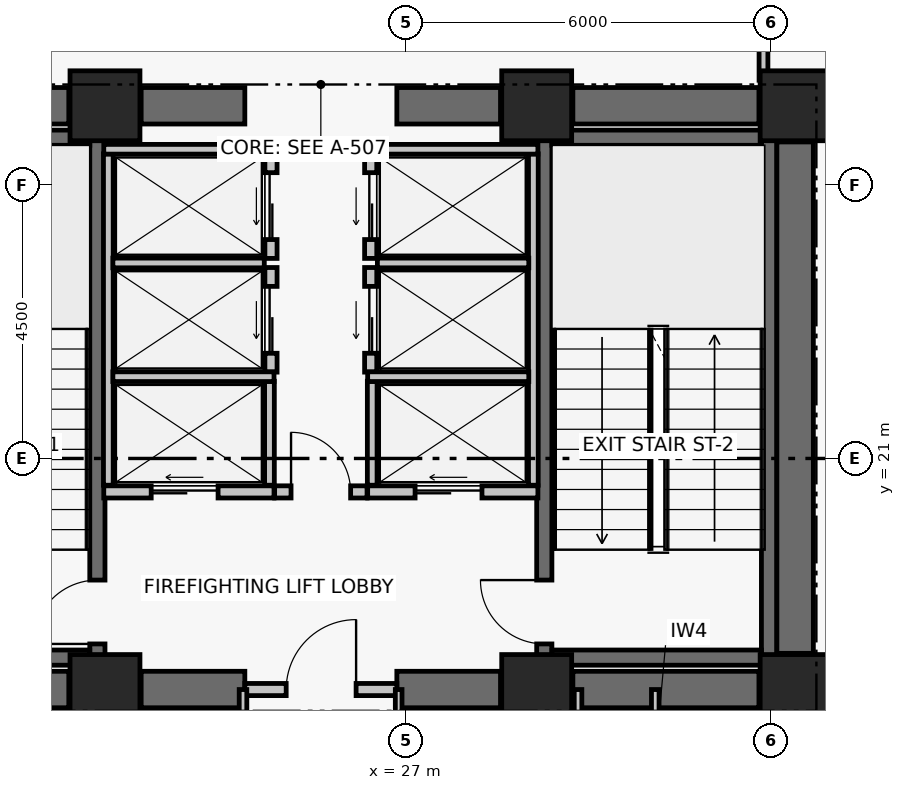
"""IFC4 building model, lengths in metres.
Left out: names, types, materials, properties, quantities, classifications, styles, units other than length and angle.
Written with IfcOpenShell. Run it as: python <this file> out.ifc"""

import sys

from ifc_helpers import new_model, si_unit, direction, frame, frame_2d, origin, origin_2d, place, context, subcontext, project, spatial, rectangle, extrude, element, fill, save


model = new_model("IFC4")
c1 = context("Model", 3, precision=1e-05, world=origin(), true_north=direction((0.0, 1.0)))
c2 = subcontext(c1, "Body", "Model", "MODEL_VIEW")
j1 = project(units=[si_unit("LENGTHUNIT", "METRE"), si_unit("PLANEANGLEUNIT", "RADIAN")], contexts=[c1])
p1 = place(None, origin())
s1 = spatial("IfcSite", under=j1, at=p1, CompositionType="ELEMENT")
p2 = place(p1, origin())
s2 = spatial("IfcBuilding", under=s1, at=p2, CompositionType="ELEMENT")
p3 = place(p2, frame((0.0, 0.0, 75.96)))
s3 = spatial("IfcBuildingStorey", under=s2, at=p3, CompositionType="ELEMENT", Elevation=75.96)
for number, where, z_axis, x_axis in (
    (1, (22.05, 17.2, 0.0), (0.0, 0.0, 1.0), (1.0, 0.0, 0.0)),
    (2, (29.15, 17.2, 0.0), (0.0, 0.0, 1.0), (1.0, 0.0, 0.0)),
    (3, (33.4, 17.2, 0.0), (0.0, 0.0, 1.0), (1.0, 0.0, 0.0)),
    (4, (22.05, 26.8, 0.0), (0.0, 0.0, 1.0), (1.0, 0.0, 0.0)),
    (5, (29.15, 26.8, 0.0), (0.0, 0.0, 1.0), (1.0, 0.0, 0.0)),
    (6, (33.4, 26.8, 0.0), (0.0, 0.0, 1.0), (1.0, 0.0, 0.0)),
):
    element("IfcColumn", number, at=place(p3, frame(where, z_axis=z_axis, x_axis=x_axis)), inside=s3, PredefinedType="COLUMN", context=c2, shape_type="SweptSolid", body=[
        extrude(rectangle(XDim=1.15, YDim=1.15, at=origin_2d()), origin(), (0.0, 0.0, 1.0), 3.72),
    ])
p4 = place(p3, frame((18.395, 17.2, 0.0), z_axis=(0.0, 0.0, 1.0), x_axis=(1.0, 0.0, 0.0)))
e7 = element("IfcWall", 7, at=p4, inside=s3, PredefinedType="SHEAR", context=c2, shape_type="SweptSolid", body=[
    extrude(rectangle(XDim=3.06, YDim=0.6, at=frame_2d((1.53, 0.0))), origin(), (0.0, 0.0, 1.0), 3.47),
])
p5 = place(p3, frame((22.645, 17.2, 0.0), z_axis=(0.0, 0.0, 1.0), x_axis=(1.0, 0.0, 0.0)))
e8 = element("IfcWall", 8, at=p5, inside=s3, PredefinedType="SHEAR", context=c2, shape_type="SweptSolid", body=[
    extrude(rectangle(XDim=1.705, YDim=0.6, at=frame_2d((0.853, 0.0))), origin(), (0.0, 0.0, 1.0), 3.47),
])
p6 = place(p3, frame((26.85, 17.2, 0.0), z_axis=(0.0, 0.0, 1.0), x_axis=(1.0, 0.0, 0.0)))
e9 = element("IfcWall", 9, at=p6, inside=s3, PredefinedType="SHEAR", context=c2, shape_type="SweptSolid", body=[
    extrude(rectangle(XDim=1.705, YDim=0.6, at=frame_2d((0.853, 0.0))), origin(), (0.0, 0.0, 1.0), 3.47),
])
p7 = place(p3, frame((29.745, 17.2, 0.0), z_axis=(0.0, 0.0, 1.0), x_axis=(1.0, 0.0, 0.0)))
e10 = element("IfcWall", 10, at=p7, inside=s3, PredefinedType="SHEAR", context=c2, shape_type="SweptSolid", body=[
    extrude(rectangle(XDim=3.06, YDim=0.6, at=frame_2d((1.53, 0.0))), origin(), (0.0, 0.0, 1.0), 3.47),
])
p8 = place(p3, frame((18.395, 26.8, 0.0), z_axis=(0.0, 0.0, 1.0), x_axis=(1.0, 0.0, 0.0)))
e11 = element("IfcWall", 11, at=p8, inside=s3, PredefinedType="SHEAR", context=c2, shape_type="SweptSolid", body=[
    extrude(rectangle(XDim=3.06, YDim=0.6, at=frame_2d((1.53, 0.0))), origin(), (0.0, 0.0, 1.0), 3.47),
])
p9 = place(p3, frame((22.645, 26.8, 0.0), z_axis=(0.0, 0.0, 1.0), x_axis=(1.0, 0.0, 0.0)))
e12 = element("IfcWall", 12, at=p9, inside=s3, PredefinedType="SHEAR", context=c2, shape_type="SweptSolid", body=[
    extrude(rectangle(XDim=1.705, YDim=0.6, at=frame_2d((0.853, 0.0))), origin(), (0.0, 0.0, 1.0), 3.47),
])
p10 = place(p3, frame((26.85, 26.8, 0.0), z_axis=(0.0, 0.0, 1.0), x_axis=(1.0, 0.0, 0.0)))
e13 = element("IfcWall", 13, at=p10, inside=s3, PredefinedType="SHEAR", context=c2, shape_type="SweptSolid", body=[
    extrude(rectangle(XDim=1.705, YDim=0.6, at=frame_2d((0.853, 0.0))), origin(), (0.0, 0.0, 1.0), 3.47),
])
p11 = place(p3, frame((29.745, 26.8, 0.0), z_axis=(0.0, 0.0, 1.0), x_axis=(1.0, 0.0, 0.0)))
e14 = element("IfcWall", 14, at=p11, inside=s3, PredefinedType="SHEAR", context=c2, shape_type="SweptSolid", body=[
    extrude(rectangle(XDim=3.06, YDim=0.6, at=frame_2d((1.53, 0.0))), origin(), (0.0, 0.0, 1.0), 3.47),
])
p12 = place(p3, frame((33.4, 17.795, 0.0), z_axis=(0.0, 0.0, 1.0), x_axis=(0.0, 1.0, 0.0)))
e15 = element("IfcWall", 15, at=p12, inside=s3, PredefinedType="SHEAR", context=c2, shape_type="SweptSolid", body=[
    extrude(rectangle(XDim=8.41, YDim=0.6, at=frame_2d((4.205, 0.0))), origin(), (0.0, 0.0, 1.0), 3.47),
])
p13 = place(p3, frame((21.925, 17.6, 0.0), z_axis=(0.0, 0.0, 1.0), x_axis=(0.0, 1.0, 0.0)))
e16 = element("IfcWall", 16, at=p13, inside=s3, PredefinedType="SHEAR", context=c2, shape_type="SweptSolid", body=[
    extrude(rectangle(XDim=8.8, YDim=0.25, at=frame_2d((4.4, 0.0))), origin(), (0.0, 0.0, 1.0), 3.47),
])
p14 = place(p13, frame((0.35, 0.0, 0.0)))
e17 = element("IfcOpeningElement", 17, at=p14, cuts=e16, PredefinedType="OPENING", context=c2, shape_type="SweptSolid", body=[
    extrude(rectangle(XDim=1.05, YDim=2.08, at=frame_2d((0.525, 1.04))), frame((0.0, 0.135, 0.0), z_axis=(0.0, -1.0, 0.0), x_axis=(1.0, 0.0, 0.0)), (0.0, 0.0, 1.0), 0.27),
])
for number, where, z_axis, x_axis in (
    (18, (18.354, 17.725, 0.0), (0.0, 0.0, 1.0), (1.0, 0.0, 0.0)),
    (19, (18.354, 26.275, 0.0), (0.0, 0.0, 1.0), (1.0, 0.0, 0.0)),
):
    element("IfcWall", number, at=place(p3, frame(where, z_axis=z_axis, x_axis=x_axis)), inside=s3, PredefinedType="SHEAR", context=c2, shape_type="SweptSolid", body=[
        extrude(rectangle(XDim=3.446, YDim=0.25, at=frame_2d((1.723, 0.0))), origin(), (0.0, 0.0, 1.0), 3.47),
    ])
p15 = place(p3, frame((29.275, 17.6, 0.0), z_axis=(0.0, 0.0, 1.0), x_axis=(0.0, 1.0, 0.0)))
e20 = element("IfcWall", 20, at=p15, inside=s3, PredefinedType="SHEAR", context=c2, shape_type="SweptSolid", body=[
    extrude(rectangle(XDim=8.8, YDim=0.25, at=frame_2d((4.4, 0.0))), origin(), (0.0, 0.0, 1.0), 3.47),
])
p16 = place(p15, frame((0.35, 0.0, 0.0)))
e21 = element("IfcOpeningElement", 21, at=p16, cuts=e20, PredefinedType="OPENING", context=c2, shape_type="SweptSolid", body=[
    extrude(rectangle(XDim=1.05, YDim=2.08, at=frame_2d((0.525, 1.04))), frame((0.0, 0.135, 0.0), z_axis=(0.0, -1.0, 0.0), x_axis=(1.0, 0.0, 0.0)), (0.0, 0.0, 1.0), 0.27),
])
p17 = place(p3, frame((32.971, 17.6, 0.0), z_axis=(0.0, 0.0, 1.0), x_axis=(0.0, 1.0, 0.0)))
e22 = element("IfcWall", 22, at=p17, inside=s3, PredefinedType="SHEAR", context=c2, shape_type="SweptSolid", body=[
    extrude(rectangle(XDim=8.8, YDim=0.25, at=frame_2d((4.4, 0.0))), origin(), (0.0, 0.0, 1.0), 3.47),
])
for number, where, z_axis, x_axis in (
    (23, (29.4, 17.725, 0.0), (0.0, 0.0, 1.0), (1.0, 0.0, 0.0)),
    (24, (29.4, 26.275, 0.0), (0.0, 0.0, 1.0), (1.0, 0.0, 0.0)),
):
    element("IfcWall", number, at=place(p3, frame(where, z_axis=z_axis, x_axis=x_axis)), inside=s3, PredefinedType="SHEAR", context=c2, shape_type="SweptSolid", body=[
        extrude(rectangle(XDim=3.446, YDim=0.25, at=frame_2d((1.723, 0.0))), origin(), (0.0, 0.0, 1.0), 3.47),
    ])
p18 = place(p3, frame((24.35, 17.2, 0.0), z_axis=(0.0, 0.0, 1.0), x_axis=(1.0, 0.0, 0.0)))
e25 = element("IfcWall", 25, at=p18, inside=s3, PredefinedType="PARTITIONING", context=c2, shape_type="SweptSolid", body=[
    extrude(rectangle(XDim=2.5, YDim=0.2, at=frame_2d((1.25, 0.0))), origin(), (0.0, 0.0, 1.0), 2.6),
])
p19 = place(p18, frame((0.68, 0.0, 0.0)))
e26 = element("IfcOpeningElement", 26, at=p19, cuts=e25, PredefinedType="OPENING", context=c2, shape_type="SweptSolid", body=[
    extrude(rectangle(XDim=1.15, YDim=2.08, at=frame_2d((0.575, 1.04))), frame((0.0, 0.11, 0.0), z_axis=(0.0, -1.0, 0.0), x_axis=(1.0, 0.0, 0.0)), (0.0, 0.0, 1.0), 0.22),
])
p20 = place(p3, frame((24.84, 20.45, 0.0), z_axis=(0.0, 0.0, 1.0), x_axis=(1.0, 0.0, 0.0)))
e27 = element("IfcWall", 27, at=p20, inside=s3, PredefinedType="PARTITIONING", context=c2, shape_type="SweptSolid", body=[
    extrude(rectangle(XDim=1.52, YDim=0.2, at=frame_2d((0.76, 0.0))), origin(), (0.0, 0.0, 1.0), 3.47),
])
p21 = place(p20, frame((0.27, 0.0, 0.0)))
e28 = element("IfcOpeningElement", 28, at=p21, cuts=e27, PredefinedType="OPENING", context=c2, shape_type="SweptSolid", body=[
    extrude(rectangle(XDim=0.98, YDim=2.06, at=frame_2d((0.49, 1.03))), frame((0.0, 0.11, 0.0), z_axis=(0.0, -1.0, 0.0), x_axis=(1.0, 0.0, 0.0)), (0.0, 0.0, 1.0), 0.22),
])
p22 = place(p3, frame((22.03, 20.45, 0.0), z_axis=(0.0, 0.0, 1.0), x_axis=(1.0, 0.0, 0.0)))
e29 = element("IfcWall", 29, at=p22, inside=s3, PredefinedType="PARTITIONING", context=c2, shape_type="SweptSolid", body=[
    extrude(rectangle(XDim=2.8, YDim=0.2, at=frame_2d((1.4, 0.0))), origin(), (0.0, 0.0, 1.0), 3.47),
])
p23 = place(p22, frame((0.78, 0.0, 0.0)))
e30 = element("IfcOpeningElement", 30, at=p23, cuts=e29, PredefinedType="OPENING", context=c2, shape_type="SweptSolid", body=[
    extrude(rectangle(XDim=1.1, YDim=2.08, at=frame_2d((0.55, 1.04))), frame((0.0, 0.11, 0.0), z_axis=(0.0, -1.0, 0.0), x_axis=(1.0, 0.0, 0.0)), (0.0, 0.0, 1.0), 0.22),
])
p24 = place(p3, frame((26.37, 20.45, 0.0), z_axis=(0.0, 0.0, 1.0), x_axis=(1.0, 0.0, 0.0)))
e31 = element("IfcWall", 31, at=p24, inside=s3, PredefinedType="PARTITIONING", context=c2, shape_type="SweptSolid", body=[
    extrude(rectangle(XDim=2.8, YDim=0.2, at=frame_2d((1.4, 0.0))), origin(), (0.0, 0.0, 1.0), 3.47),
])
p25 = place(p24, frame((0.78, 0.0, 0.0)))
e32 = element("IfcOpeningElement", 32, at=p25, cuts=e31, PredefinedType="OPENING", context=c2, shape_type="SweptSolid", body=[
    extrude(rectangle(XDim=1.1, YDim=2.08, at=frame_2d((0.55, 1.04))), frame((0.0, 0.11, 0.0), z_axis=(0.0, -1.0, 0.0), x_axis=(1.0, 0.0, 0.0)), (0.0, 0.0, 1.0), 0.22),
])
p26 = place(p3, frame((24.78, 22.42, 0.0), z_axis=(0.0, 0.0, 1.0), x_axis=(0.0, 1.0, 0.0)))
e33 = element("IfcWall", 33, at=p26, inside=s3, PredefinedType="PARTITIONING", context=c2, shape_type="SweptSolid", body=[
    extrude(rectangle(XDim=1.72, YDim=0.2, at=frame_2d((0.86, 0.0))), origin(), (0.0, 0.0, 1.0), 3.47),
])
p27 = place(p26, frame((0.31, 0.0, 0.0)))
e34 = element("IfcOpeningElement", 34, at=p27, cuts=e33, PredefinedType="OPENING", context=c2, shape_type="SweptSolid", body=[
    extrude(rectangle(XDim=1.1, YDim=2.08, at=frame_2d((0.55, 1.04))), frame((0.0, 0.11, 0.0), z_axis=(0.0, -1.0, 0.0), x_axis=(1.0, 0.0, 0.0)), (0.0, 0.0, 1.0), 0.22),
])
p28 = place(p3, frame((24.78, 24.29, 0.0), z_axis=(0.0, 0.0, 1.0), x_axis=(0.0, 1.0, 0.0)))
e35 = element("IfcWall", 35, at=p28, inside=s3, PredefinedType="PARTITIONING", context=c2, shape_type="SweptSolid", body=[
    extrude(rectangle(XDim=1.72, YDim=0.2, at=frame_2d((0.86, 0.0))), origin(), (0.0, 0.0, 1.0), 3.47),
])
p29 = place(p28, frame((0.31, 0.0, 0.0)))
e36 = element("IfcOpeningElement", 36, at=p29, cuts=e35, PredefinedType="OPENING", context=c2, shape_type="SweptSolid", body=[
    extrude(rectangle(XDim=1.1, YDim=2.08, at=frame_2d((0.55, 1.04))), frame((0.0, 0.11, 0.0), z_axis=(0.0, -1.0, 0.0), x_axis=(1.0, 0.0, 0.0)), (0.0, 0.0, 1.0), 0.22),
])
p30 = place(p3, frame((26.42, 22.42, 0.0), z_axis=(0.0, 0.0, 1.0), x_axis=(0.0, 1.0, 0.0)))
e37 = element("IfcWall", 37, at=p30, inside=s3, PredefinedType="PARTITIONING", context=c2, shape_type="SweptSolid", body=[
    extrude(rectangle(XDim=1.72, YDim=0.2, at=frame_2d((0.86, 0.0))), origin(), (0.0, 0.0, 1.0), 3.47),
])
p31 = place(p30, frame((0.31, 0.0, 0.0)))
e38 = element("IfcOpeningElement", 38, at=p31, cuts=e37, PredefinedType="OPENING", context=c2, shape_type="SweptSolid", body=[
    extrude(rectangle(XDim=1.1, YDim=2.08, at=frame_2d((0.55, 1.04))), frame((0.0, 0.11, 0.0), z_axis=(0.0, -1.0, 0.0), x_axis=(1.0, 0.0, 0.0)), (0.0, 0.0, 1.0), 0.22),
])
p32 = place(p3, frame((26.42, 24.29, 0.0), z_axis=(0.0, 0.0, 1.0), x_axis=(0.0, 1.0, 0.0)))
e39 = element("IfcWall", 39, at=p32, inside=s3, PredefinedType="PARTITIONING", context=c2, shape_type="SweptSolid", body=[
    extrude(rectangle(XDim=1.72, YDim=0.2, at=frame_2d((0.86, 0.0))), origin(), (0.0, 0.0, 1.0), 3.47),
])
p33 = place(p32, frame((0.31, 0.0, 0.0)))
e40 = element("IfcOpeningElement", 40, at=p33, cuts=e39, PredefinedType="OPENING", context=c2, shape_type="SweptSolid", body=[
    extrude(rectangle(XDim=1.1, YDim=2.08, at=frame_2d((0.55, 1.04))), frame((0.0, 0.11, 0.0), z_axis=(0.0, -1.0, 0.0), x_axis=(1.0, 0.0, 0.0)), (0.0, 0.0, 1.0), 0.22),
])
p34 = place(p3, frame((22.105, 20.56, 0.0), z_axis=(0.0, 0.0, 1.0), x_axis=(0.0, 1.0, 0.0)))
e41 = element("IfcWall", 41, at=p34, inside=s3, PredefinedType="PARTITIONING", context=c2, shape_type="SweptSolid", body=[
    extrude(rectangle(XDim=5.45, YDim=0.16, at=frame_2d((2.725, 0.0))), origin(), (0.0, 0.0, 1.0), 3.47),
])
p35 = place(p3, frame((24.755, 20.56, 0.0), z_axis=(0.0, 0.0, 1.0), x_axis=(0.0, 1.0, 0.0)))
e42 = element("IfcWall", 42, at=p35, inside=s3, PredefinedType="PARTITIONING", context=c2, shape_type="SweptSolid", body=[
    extrude(rectangle(XDim=1.71, YDim=0.16, at=frame_2d((0.855, 0.0))), origin(), (0.0, 0.0, 1.0), 3.47),
])
p36 = place(p3, frame((22.18, 22.345, 0.0), z_axis=(0.0, 0.0, 1.0), x_axis=(1.0, 0.0, 0.0)))
e43 = element("IfcWall", 43, at=p36, inside=s3, PredefinedType="PARTITIONING", context=c2, shape_type="SweptSolid", body=[
    extrude(rectangle(XDim=2.65, YDim=0.16, at=frame_2d((1.325, 0.0))), origin(), (0.0, 0.0, 1.0), 3.47),
])
p37 = place(p3, frame((22.18, 24.215, 0.0), z_axis=(0.0, 0.0, 1.0), x_axis=(1.0, 0.0, 0.0)))
e44 = element("IfcWall", 44, at=p37, inside=s3, PredefinedType="PARTITIONING", context=c2, shape_type="SweptSolid", body=[
    extrude(rectangle(XDim=2.49, YDim=0.16, at=frame_2d((1.245, 0.0))), origin(), (0.0, 0.0, 1.0), 3.47),
])
p38 = place(p3, frame((22.03, 26.085, 0.0), z_axis=(0.0, 0.0, 1.0), x_axis=(1.0, 0.0, 0.0)))
e45 = element("IfcWall", 45, at=p38, inside=s3, PredefinedType="PARTITIONING", context=c2, shape_type="SweptSolid", body=[
    extrude(rectangle(XDim=2.83, YDim=0.16, at=frame_2d((1.415, 0.0))), origin(), (0.0, 0.0, 1.0), 3.47),
])
p39 = place(p3, frame((29.095, 20.56, 0.0), z_axis=(0.0, 0.0, 1.0), x_axis=(0.0, 1.0, 0.0)))
e46 = element("IfcWall", 46, at=p39, inside=s3, PredefinedType="PARTITIONING", context=c2, shape_type="SweptSolid", body=[
    extrude(rectangle(XDim=5.45, YDim=0.16, at=frame_2d((2.725, 0.0))), origin(), (0.0, 0.0, 1.0), 3.47),
])
p40 = place(p3, frame((26.445, 20.56, 0.0), z_axis=(0.0, 0.0, 1.0), x_axis=(0.0, 1.0, 0.0)))
e47 = element("IfcWall", 47, at=p40, inside=s3, PredefinedType="PARTITIONING", context=c2, shape_type="SweptSolid", body=[
    extrude(rectangle(XDim=1.71, YDim=0.16, at=frame_2d((0.855, 0.0))), origin(), (0.0, 0.0, 1.0), 3.47),
])
p41 = place(p3, frame((26.37, 22.345, 0.0), z_axis=(0.0, 0.0, 1.0), x_axis=(1.0, 0.0, 0.0)))
e48 = element("IfcWall", 48, at=p41, inside=s3, PredefinedType="PARTITIONING", context=c2, shape_type="SweptSolid", body=[
    extrude(rectangle(XDim=2.65, YDim=0.16, at=frame_2d((1.325, 0.0))), origin(), (0.0, 0.0, 1.0), 3.47),
])
p42 = place(p3, frame((26.53, 24.215, 0.0), z_axis=(0.0, 0.0, 1.0), x_axis=(1.0, 0.0, 0.0)))
e49 = element("IfcWall", 49, at=p42, inside=s3, PredefinedType="PARTITIONING", context=c2, shape_type="SweptSolid", body=[
    extrude(rectangle(XDim=2.49, YDim=0.16, at=frame_2d((1.245, 0.0))), origin(), (0.0, 0.0, 1.0), 3.47),
])
p43 = place(p3, frame((26.34, 26.085, 0.0), z_axis=(0.0, 0.0, 1.0), x_axis=(1.0, 0.0, 0.0)))
e50 = element("IfcWall", 50, at=p43, inside=s3, PredefinedType="PARTITIONING", context=c2, shape_type="SweptSolid", body=[
    extrude(rectangle(XDim=2.83, YDim=0.16, at=frame_2d((1.415, 0.0))), origin(), (0.0, 0.0, 1.0), 3.47),
])
for number, where, z_axis, x_axis in (
    (51, (22.36, 14.95, 0.0), (0.0, 0.0, 1.0), (0.0, 1.0, 0.0)),
    (52, (24.32, 14.95, 0.0), (0.0, 0.0, 1.0), (0.0, 1.0, 0.0)),
):
    element("IfcWall", number, at=place(p3, frame(where, z_axis=z_axis, x_axis=x_axis)), inside=s3, PredefinedType="PARTITIONING", context=c2, shape_type="SweptSolid", body=[
        extrude(rectangle(XDim=2.25, YDim=0.125, at=frame_2d((1.125, 0.0))), origin(), (0.0, 0.0, 1.0), 2.6),
    ])
p44 = place(p3, frame((26.88, 14.95, 0.0), z_axis=(0.0, 0.0, 1.0), x_axis=(0.0, 1.0, 0.0)))
e53 = element("IfcWall", 53, at=p44, inside=s3, PredefinedType="PARTITIONING", context=c2, shape_type="SweptSolid", body=[
    extrude(rectangle(XDim=2.25, YDim=0.11, at=frame_2d((1.125, 0.0))), origin(), (0.0, 0.0, 1.0), 2.6),
])
for number, where, z_axis, x_axis in (
    (54, (29.83, 14.95, 0.0), (0.0, 0.0, 1.0), (0.0, 1.0, 0.0)),
    (55, (31.1, 14.95, 0.0), (0.0, 0.0, 1.0), (0.0, 1.0, 0.0)),
):
    element("IfcWall", number, at=place(p3, frame(where, z_axis=z_axis, x_axis=x_axis)), inside=s3, PredefinedType="PARTITIONING", context=c2, shape_type="SweptSolid", body=[
        extrude(rectangle(XDim=2.25, YDim=0.125, at=frame_2d((1.125, 0.0))), origin(), (0.0, 0.0, 1.0), 2.6),
    ])
p45 = place(p3, frame((33.74, 27.22, 0.0), z_axis=(0.0, 0.0, 1.0), x_axis=(-1.0, 0.0, 0.0)))
e56 = element("IfcWall", 56, at=p45, inside=s3, PredefinedType="PARTITIONING", context=c2, shape_type="SweptSolid", body=[
    extrude(rectangle(XDim=0.86, YDim=0.145, at=frame_2d((0.43, 0.0))), origin(), (0.0, 0.0, 1.0), 2.6),
])
p46 = place(p3, frame((32.88, 27.22, 0.0), z_axis=(0.0, 0.0, 1.0), x_axis=(0.0, 1.0, 0.0)))
e57 = element("IfcWall", 57, at=p46, inside=s3, PredefinedType="PARTITIONING", context=c2, shape_type="SweptSolid", body=[
    extrude(rectangle(XDim=0.671, YDim=0.145, at=frame_2d((0.335, 0.0))), origin(), (0.0, 0.0, 1.0), 2.6),
])
p47 = place(p14, origin())
e58 = element("IfcDoor", 58, at=p47, inside=s3, OperationType="SINGLE_SWING_LEFT", PredefinedType="DOOR", context=c2, shape_type="SweptSolid", body=[
    extrude(rectangle(XDim=1.05, YDim=2.08, at=frame_2d((0.525, 1.04))), frame((0.0, 0.025, 0.0), z_axis=(0.0, -1.0, 0.0), x_axis=(1.0, 0.0, 0.0)), (0.0, 0.0, 1.0), 0.05),
])
fill(e17, e58)
p48 = place(p16, origin())
e59 = element("IfcDoor", 59, at=p48, inside=s3, OperationType="SINGLE_SWING_RIGHT", PredefinedType="DOOR", context=c2, shape_type="SweptSolid", body=[
    extrude(rectangle(XDim=1.05, YDim=2.08, at=frame_2d((0.525, 1.04))), frame((0.0, 0.025, 0.0), z_axis=(0.0, -1.0, 0.0), x_axis=(1.0, 0.0, 0.0)), (0.0, 0.0, 1.0), 0.05),
])
fill(e21, e59)
p49 = place(p19, origin())
e60 = element("IfcDoor", 60, at=p49, inside=s3, OperationType="SINGLE_SWING_RIGHT", PredefinedType="DOOR", context=c2, shape_type="SweptSolid", body=[
    extrude(rectangle(XDim=1.15, YDim=2.08, at=frame_2d((0.575, 1.04))), frame((0.0, 0.025, 0.0), z_axis=(0.0, -1.0, 0.0), x_axis=(1.0, 0.0, 0.0)), (0.0, 0.0, 1.0), 0.05),
])
fill(e26, e60)
p50 = place(p21, origin())
e61 = element("IfcDoor", 61, at=p50, inside=s3, OperationType="SINGLE_SWING_LEFT", PredefinedType="DOOR", context=c2, shape_type="SweptSolid", body=[
    extrude(rectangle(XDim=0.98, YDim=2.06, at=frame_2d((0.49, 1.03))), frame((0.0, 0.025, 0.0), z_axis=(0.0, -1.0, 0.0), x_axis=(1.0, 0.0, 0.0)), (0.0, 0.0, 1.0), 0.05),
])
fill(e28, e61)
p51 = place(p23, origin())
e62 = element("IfcDoor", 62, at=p51, inside=s3, OperationType="DOUBLE_DOOR_SLIDING", PredefinedType="DOOR", context=c2, shape_type="SweptSolid", body=[
    extrude(rectangle(XDim=1.1, YDim=2.08, at=frame_2d((0.55, 1.04))), frame((0.0, 0.025, 0.0), z_axis=(0.0, -1.0, 0.0), x_axis=(1.0, 0.0, 0.0)), (0.0, 0.0, 1.0), 0.05),
])
fill(e30, e62)
p52 = place(p25, origin())
e63 = element("IfcDoor", 63, at=p52, inside=s3, OperationType="DOUBLE_DOOR_SLIDING", PredefinedType="DOOR", context=c2, shape_type="SweptSolid", body=[
    extrude(rectangle(XDim=1.1, YDim=2.08, at=frame_2d((0.55, 1.04))), frame((0.0, 0.025, 0.0), z_axis=(0.0, -1.0, 0.0), x_axis=(1.0, 0.0, 0.0)), (0.0, 0.0, 1.0), 0.05),
])
fill(e32, e63)
p53 = place(p27, origin())
e64 = element("IfcDoor", 64, at=p53, inside=s3, OperationType="DOUBLE_DOOR_SLIDING", PredefinedType="DOOR", context=c2, shape_type="SweptSolid", body=[
    extrude(rectangle(XDim=1.1, YDim=2.08, at=frame_2d((0.55, 1.04))), frame((0.0, 0.025, 0.0), z_axis=(0.0, -1.0, 0.0), x_axis=(1.0, 0.0, 0.0)), (0.0, 0.0, 1.0), 0.05),
])
fill(e34, e64)
p54 = place(p29, origin())
e65 = element("IfcDoor", 65, at=p54, inside=s3, OperationType="DOUBLE_DOOR_SLIDING", PredefinedType="DOOR", context=c2, shape_type="SweptSolid", body=[
    extrude(rectangle(XDim=1.1, YDim=2.08, at=frame_2d((0.55, 1.04))), frame((0.0, 0.025, 0.0), z_axis=(0.0, -1.0, 0.0), x_axis=(1.0, 0.0, 0.0)), (0.0, 0.0, 1.0), 0.05),
])
fill(e36, e65)
p55 = place(p31, origin())
e66 = element("IfcDoor", 66, at=p55, inside=s3, OperationType="DOUBLE_DOOR_SLIDING", PredefinedType="DOOR", context=c2, shape_type="SweptSolid", body=[
    extrude(rectangle(XDim=1.1, YDim=2.08, at=frame_2d((0.55, 1.04))), frame((0.0, 0.025, 0.0), z_axis=(0.0, -1.0, 0.0), x_axis=(1.0, 0.0, 0.0)), (0.0, 0.0, 1.0), 0.05),
])
fill(e38, e66)
p56 = place(p33, origin())
e67 = element("IfcDoor", 67, at=p56, inside=s3, OperationType="DOUBLE_DOOR_SLIDING", PredefinedType="DOOR", context=c2, shape_type="SweptSolid", body=[
    extrude(rectangle(XDim=1.1, YDim=2.08, at=frame_2d((0.55, 1.04))), frame((0.0, 0.025, 0.0), z_axis=(0.0, -1.0, 0.0), x_axis=(1.0, 0.0, 0.0)), (0.0, 0.0, 1.0), 0.05),
])
fill(e40, e67)
save(model, sys.argv[1])
